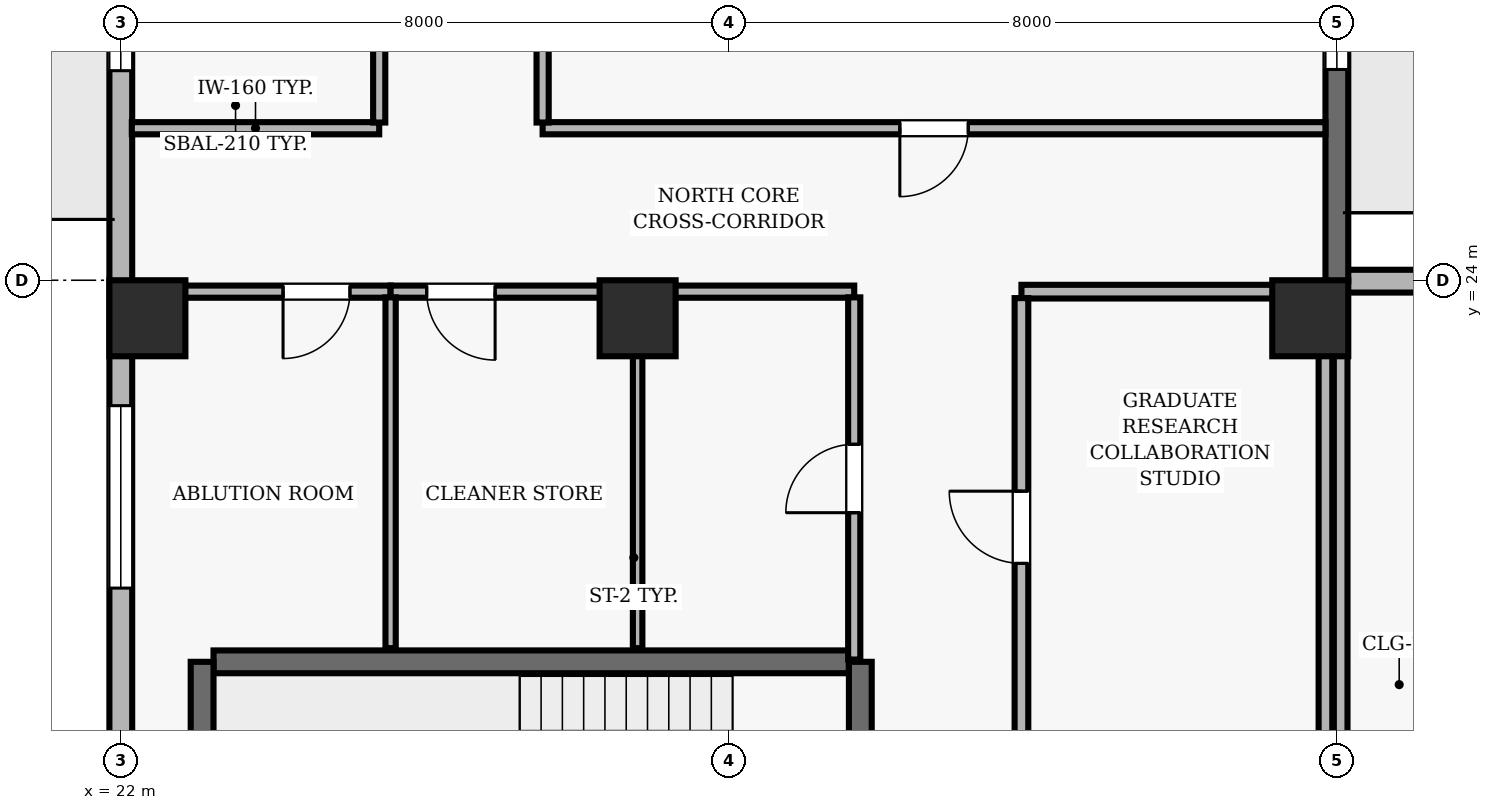
"""IFC4 building model, lengths in metres.
Left out: names, types, materials, properties, quantities, classifications, styles, units other than length and angle.
Written with IfcOpenShell. Run it as: python <this file> out.ifc"""

import sys

from ifc_helpers import new_model, si_unit, direction, frame, frame_2d, origin, origin_2d, place, context, subcontext, project, spatial, rectangle, extrude, element, fill, save


model = new_model("IFC4")
c1 = context("Model", 3, precision=1e-05, world=origin(), true_north=direction((0.0, 1.0)))
c2 = subcontext(c1, "Body", "Model", "MODEL_VIEW")
j1 = project(units=[si_unit("LENGTHUNIT", "METRE"), si_unit("PLANEANGLEUNIT", "RADIAN")], contexts=[c1])
p1 = place(None, origin())
s1 = spatial("IfcSite", under=j1, at=p1, CompositionType="ELEMENT")
p2 = place(p1, origin())
s2 = spatial("IfcBuilding", under=s1, at=p2, CompositionType="ELEMENT")
p3 = place(p2, frame((0.0, 0.0, 191.4)))
s3 = spatial("IfcBuildingStorey", under=s2, at=p3, CompositionType="ELEMENT", Elevation=191.4)
for number, where, z_axis, x_axis in (
    (1, (22.35, 23.5, 0.0), (0.0, 0.0, 1.0), (1.0, 0.0, 0.0)),
    (2, (28.8, 23.5, 0.0), (0.0, 0.0, 1.0), (1.0, 0.0, 0.0)),
    (3, (37.65, 23.5, 0.0), (0.0, 0.0, 1.0), (1.0, 0.0, 0.0)),
):
    element("IfcColumn", number, at=place(p3, frame(where, z_axis=z_axis, x_axis=x_axis)), inside=s3, PredefinedType="COLUMN", context=c2, shape_type="SweptSolid", body=[
        extrude(rectangle(XDim=1.0, YDim=1.0, at=origin_2d()), origin(), (0.0, 0.0, 1.0), 3.9),
    ])
p4 = place(p3, frame((47.35, 23.988, 0.0), z_axis=(0.0, 0.0, 1.0), x_axis=(-1.0, 0.0, 0.0)))
e4 = element("IfcWall", 4, at=p4, inside=s3, PredefinedType="SOLIDWALL", context=c2, shape_type="SweptSolid", body=[
    extrude(rectangle(XDim=9.35, YDim=0.3, at=frame_2d((4.675, 0.0))), origin(), (0.0, 0.0, 1.0), 3.69),
])
p5 = place(p4, frame((3.925, 0.0, 0.9)))
e5 = element("IfcOpeningElement", 5, at=p5, cuts=e4, PredefinedType="OPENING", context=c2, shape_type="SweptSolid", body=[
    extrude(rectangle(XDim=1.5, YDim=1.8, at=frame_2d((0.75, 0.9))), frame((0.0, 0.16, 0.0), z_axis=(0.0, -1.0, 0.0), x_axis=(1.0, 0.0, 0.0)), (0.0, 0.0, 1.0), 0.32),
])
p6 = place(p3, frame((38.0, 23.988, 0.0), z_axis=(0.0, 0.0, 1.0), x_axis=(0.0, 1.0, 0.0)))
e6 = element("IfcWall", 6, at=p6, inside=s3, PredefinedType="SOLIDWALL", context=c2, shape_type="SweptSolid", body=[
    extrude(rectangle(XDim=16.712, YDim=0.3, at=frame_2d((8.356, 0.0))), origin(), (0.0, 0.0, 1.0), 3.69),
])
p7 = place(p6, frame((7.956, 0.0, 0.0)))
e7 = element("IfcOpeningElement", 7, at=p7, cuts=e6, PredefinedType="OPENING", context=c2, shape_type="SweptSolid", body=[
    extrude(rectangle(XDim=1.0, YDim=2.2, at=frame_2d((0.5, 1.1))), frame((0.0, 0.16, 0.0), z_axis=(0.0, -1.0, 0.0), x_axis=(1.0, 0.0, 0.0)), (0.0, 0.0, 1.0), 0.32),
])
p8 = place(p6, frame((2.785, 0.0, 0.9)))
e8 = element("IfcOpeningElement", 8, at=p8, cuts=e6, PredefinedType="OPENING", context=c2, shape_type="SweptSolid", body=[
    extrude(rectangle(XDim=1.8, YDim=1.8, at=frame_2d((0.9, 0.9))), frame((0.0, 0.16, 0.0), z_axis=(0.0, -1.0, 0.0), x_axis=(1.0, 0.0, 0.0)), (0.0, 0.0, 1.0), 0.32),
])
p9 = place(p3, frame((22.0, 40.7, 0.0), z_axis=(0.0, 0.0, 1.0), x_axis=(0.0, -1.0, 0.0)))
e9 = element("IfcWall", 9, at=p9, inside=s3, PredefinedType="SOLIDWALL", context=c2, shape_type="SweptSolid", body=[
    extrude(rectangle(XDim=38.2, YDim=0.3, at=frame_2d((19.1, 0.0))), origin(), (0.0, 0.0, 1.0), 3.69),
])
p10 = place(p9, frame((7.8, 0.0, 0.0)))
e10 = element("IfcOpeningElement", 10, at=p10, cuts=e9, PredefinedType="OPENING", context=c2, shape_type="SweptSolid", body=[
    extrude(rectangle(XDim=1.0, YDim=2.2, at=frame_2d((0.5, 1.1))), frame((0.0, 0.16, 0.0), z_axis=(0.0, -1.0, 0.0), x_axis=(1.0, 0.0, 0.0)), (0.0, 0.0, 1.0), 0.32),
])
p11 = place(p9, frame((11.543, 0.0, 0.9)))
e11 = element("IfcOpeningElement", 11, at=p11, cuts=e9, PredefinedType="OPENING", context=c2, shape_type="SweptSolid", body=[
    extrude(rectangle(XDim=2.4, YDim=2.2, at=frame_2d((1.2, 1.1))), frame((0.0, 0.16, 0.0), z_axis=(0.0, -1.0, 0.0), x_axis=(1.0, 0.0, 0.0)), (0.0, 0.0, 1.0), 0.32),
])
p12 = place(p9, frame((18.35, 0.0, 0.9)))
e12 = element("IfcOpeningElement", 12, at=p12, cuts=e9, PredefinedType="OPENING", context=c2, shape_type="SweptSolid", body=[
    extrude(rectangle(XDim=2.4, YDim=2.2, at=frame_2d((1.2, 1.1))), frame((0.0, 0.16, 0.0), z_axis=(0.0, -1.0, 0.0), x_axis=(1.0, 0.0, 0.0)), (0.0, 0.0, 1.0), 0.32),
])
p13 = place(p9, frame((22.907, 0.0, 0.9)))
e13 = element("IfcOpeningElement", 13, at=p13, cuts=e9, PredefinedType="OPENING", context=c2, shape_type="SweptSolid", body=[
    extrude(rectangle(XDim=2.4, YDim=2.2, at=frame_2d((1.2, 1.1))), frame((0.0, 0.16, 0.0), z_axis=(0.0, -1.0, 0.0), x_axis=(1.0, 0.0, 0.0)), (0.0, 0.0, 1.0), 0.32),
])
p14 = place(p9, frame((28.814, 0.0, 0.9)))
e14 = element("IfcOpeningElement", 14, at=p14, cuts=e9, PredefinedType="OPENING", context=c2, shape_type="SweptSolid", body=[
    extrude(rectangle(XDim=2.4, YDim=2.2, at=frame_2d((1.2, 1.1))), frame((0.0, 0.16, 0.0), z_axis=(0.0, -1.0, 0.0), x_axis=(1.0, 0.0, 0.0)), (0.0, 0.0, 1.0), 0.32),
])
p15 = place(p3, frame((31.58, 18.98, 0.0), z_axis=(0.0, 0.0, 1.0), x_axis=(-1.0, 0.0, 0.0)))
e15 = element("IfcWall", 15, at=p15, inside=s3, PredefinedType="SHEAR", context=c2, shape_type="SweptSolid", body=[
    extrude(rectangle(XDim=8.36, YDim=0.3, at=frame_2d((4.18, 0.0))), origin(), (0.0, 0.0, 1.0), 3.69),
])
p16 = place(p3, frame((23.07, 18.98, 0.0), z_axis=(0.0, 0.0, 1.0), x_axis=(0.0, -1.0, 0.0)))
e16 = element("IfcWall", 16, at=p16, inside=s3, PredefinedType="SHEAR", context=c2, shape_type="SweptSolid", body=[
    extrude(rectangle(XDim=3.51, YDim=0.3, at=frame_2d((1.755, 0.0))), origin(), (0.0, 0.0, 1.0), 3.69),
])
p17 = place(p3, frame((31.73, 15.47, 0.0), z_axis=(0.0, 0.0, 1.0), x_axis=(0.0, 1.0, 0.0)))
e17 = element("IfcWall", 17, at=p17, inside=s3, PredefinedType="SHEAR", context=c2, shape_type="SweptSolid", body=[
    extrude(rectangle(XDim=3.51, YDim=0.3, at=frame_2d((1.755, 0.0))), origin(), (0.0, 0.0, 1.0), 3.69),
])
p18 = place(p17, frame((1.18, 0.0, 0.0)))
e18 = element("IfcOpeningElement", 18, at=p18, cuts=e17, PredefinedType="OPENING", context=c2, shape_type="SweptSolid", body=[
    extrude(rectangle(XDim=1.15, YDim=2.15, at=frame_2d((0.575, 1.075))), frame((0.0, 0.16, 0.0), z_axis=(0.0, -1.0, 0.0), x_axis=(1.0, 0.0, 0.0)), (0.0, 0.0, 1.0), 0.32),
])
p19 = place(p3, frame((25.4, 26.0, 0.0), z_axis=(0.0, 0.0, 1.0), x_axis=(-1.0, 0.0, 0.0)))
e19 = element("IfcWall", 19, at=p19, inside=s3, PredefinedType="PARTITIONING", context=c2, shape_type="SweptSolid", body=[
    extrude(rectangle(XDim=3.255, YDim=0.16, at=frame_2d((1.627, 0.0))), origin(), (0.0, 0.0, 1.0), 3.69),
])
p20 = place(p3, frame((25.55, 23.85, 0.0), z_axis=(0.0, 0.0, 1.0), x_axis=(-1.0, 0.0, 0.0)))
e20 = element("IfcWall", 20, at=p20, inside=s3, PredefinedType="PARTITIONING", context=c2, shape_type="SweptSolid", body=[
    extrude(rectangle(XDim=3.35, YDim=0.16, at=frame_2d((1.675, 0.0))), origin(), (0.0, 0.0, 1.0), 3.139),
])
p21 = place(p20, frame((0.535, 0.0, 0.0)))
e21 = element("IfcOpeningElement", 21, at=p21, cuts=e20, PredefinedType="OPENING", context=c2, shape_type="SweptSolid", body=[
    extrude(rectangle(XDim=0.88, YDim=2.1, at=frame_2d((0.44, 1.05))), frame((0.0, 0.09, 0.0), z_axis=(0.0, -1.0, 0.0), x_axis=(1.0, 0.0, 0.0)), (0.0, 0.0, 1.0), 0.18),
])
p22 = place(p3, frame((28.8, 23.85, 0.0), z_axis=(0.0, 0.0, 1.0), x_axis=(-1.0, 0.0, 0.0)))
e22 = element("IfcWall", 22, at=p22, inside=s3, PredefinedType="PARTITIONING", context=c2, shape_type="SweptSolid", body=[
    extrude(rectangle(XDim=3.25, YDim=0.16, at=frame_2d((1.625, 0.0))), origin(), (0.0, 0.0, 1.0), 3.139),
])
p23 = place(p22, frame((1.875, 0.0, 0.0)))
e23 = element("IfcOpeningElement", 23, at=p23, cuts=e22, PredefinedType="OPENING", context=c2, shape_type="SweptSolid", body=[
    extrude(rectangle(XDim=0.9, YDim=2.1, at=frame_2d((0.45, 1.05))), frame((0.0, 0.09, 0.0), z_axis=(0.0, -1.0, 0.0), x_axis=(1.0, 0.0, 0.0)), (0.0, 0.0, 1.0), 0.18),
])
p24 = place(p3, frame((31.65, 23.85, 0.0), z_axis=(0.0, 0.0, 1.0), x_axis=(-1.0, 0.0, 0.0)))
e24 = element("IfcWall", 24, at=p24, inside=s3, PredefinedType="PARTITIONING", context=c2, shape_type="SweptSolid", body=[
    extrude(rectangle(XDim=2.85, YDim=0.16, at=frame_2d((1.425, 0.0))), origin(), (0.0, 0.0, 1.0), 3.139),
])
p25 = place(p3, frame((37.85, 23.85, 0.0), z_axis=(0.0, 0.0, 1.0), x_axis=(-1.0, 0.0, 0.0)))
e25 = element("IfcWall", 25, at=p25, inside=s3, PredefinedType="PARTITIONING", context=c2, shape_type="SweptSolid", body=[
    extrude(rectangle(XDim=4.0, YDim=0.18, at=frame_2d((2.0, 0.0))), origin(), (0.0, 0.0, 1.0), 3.139),
])
p26 = place(p3, frame((37.85, 26.0, 0.0), z_axis=(0.0, 0.0, 1.0), x_axis=(-1.0, 0.0, 0.0)))
e26 = element("IfcWall", 26, at=p26, inside=s3, PredefinedType="PARTITIONING", context=c2, shape_type="SweptSolid", body=[
    extrude(rectangle(XDim=10.3, YDim=0.16, at=frame_2d((5.15, 0.0))), origin(), (0.0, 0.0, 1.0), 3.69),
])
p27 = place(p26, frame((4.7, 0.0, 0.0)))
e27 = element("IfcOpeningElement", 27, at=p27, cuts=e26, PredefinedType="OPENING", context=c2, shape_type="SweptSolid", body=[
    extrude(rectangle(XDim=0.9, YDim=2.1, at=frame_2d((0.45, 1.05))), frame((0.0, 0.09, 0.0), z_axis=(0.0, -1.0, 0.0), x_axis=(1.0, 0.0, 0.0)), (0.0, 0.0, 1.0), 0.18),
])
p28 = place(p3, frame((25.4, 29.942, 0.0), z_axis=(0.0, 0.0, 1.0), x_axis=(0.0, -1.0, 0.0)))
e28 = element("IfcWall", 28, at=p28, inside=s3, PredefinedType="PARTITIONING", context=c2, shape_type="SweptSolid", body=[
    extrude(rectangle(XDim=3.867, YDim=0.16, at=frame_2d((1.934, 0.0))), origin(), (0.0, 0.0, 1.0), 3.69),
])
p29 = place(p28, frame((1.484, 0.0, 0.0)))
e29 = element("IfcOpeningElement", 29, at=p29, cuts=e28, PredefinedType="OPENING", context=c2, shape_type="SweptSolid", body=[
    extrude(rectangle(XDim=0.9, YDim=2.1, at=frame_2d((0.45, 1.05))), frame((0.0, 0.09, 0.0), z_axis=(0.0, -1.0, 0.0), x_axis=(1.0, 0.0, 0.0)), (0.0, 0.0, 1.0), 0.18),
])
p30 = place(p3, frame((25.55, 19.16, 0.0), z_axis=(0.0, 0.0, 1.0), x_axis=(0.0, 1.0, 0.0)))
e30 = element("IfcWall", 30, at=p30, inside=s3, PredefinedType="PARTITIONING", context=c2, shape_type="SweptSolid", body=[
    extrude(rectangle(XDim=4.615, YDim=0.135, at=frame_2d((2.308, 0.0))), origin(), (0.0, 0.0, 1.0), 3.69),
])
p31 = place(p3, frame((27.55, 26.075, 0.0), z_axis=(0.0, 0.0, 1.0), x_axis=(0.0, 1.0, 0.0)))
e31 = element("IfcWall", 31, at=p31, inside=s3, PredefinedType="PARTITIONING", context=c2, shape_type="SweptSolid", body=[
    extrude(rectangle(XDim=3.867, YDim=0.16, at=frame_2d((1.934, 0.0))), origin(), (0.0, 0.0, 1.0), 3.69),
])
p32 = place(p3, frame((28.8, 23.775, 0.0), z_axis=(0.0, 0.0, 1.0), x_axis=(0.0, -1.0, 0.0)))
e32 = element("IfcWall", 32, at=p32, inside=s3, PredefinedType="PARTITIONING", context=c2, shape_type="SweptSolid", body=[
    extrude(rectangle(XDim=4.615, YDim=0.125, at=frame_2d((2.308, 0.0))), origin(), (0.0, 0.0, 1.0), 3.69),
])
p33 = place(p3, frame((31.65, 19.01, 0.0), z_axis=(0.0, 0.0, 1.0), x_axis=(0.0, 1.0, 0.0)))
e33 = element("IfcWall", 33, at=p33, inside=s3, PredefinedType="PARTITIONING", context=c2, shape_type="SweptSolid", body=[
    extrude(rectangle(XDim=4.765, YDim=0.16, at=frame_2d((2.382, 0.0))), origin(), (0.0, 0.0, 1.0), 3.69),
])
p34 = place(p33, frame((1.932, 0.0, 0.0)))
e34 = element("IfcOpeningElement", 34, at=p34, cuts=e33, PredefinedType="OPENING", context=c2, shape_type="SweptSolid", body=[
    extrude(rectangle(XDim=0.9, YDim=2.1, at=frame_2d((0.45, 1.05))), frame((0.0, 0.09, 0.0), z_axis=(0.0, -1.0, 0.0), x_axis=(1.0, 0.0, 0.0)), (0.0, 0.0, 1.0), 0.18),
])
p35 = place(p3, frame((33.85, 17.735, 0.0), z_axis=(0.0, 0.0, 1.0), x_axis=(0.0, 1.0, 0.0)))
e35 = element("IfcWall", 35, at=p35, inside=s3, PredefinedType="PARTITIONING", context=c2, shape_type="SweptSolid", body=[
    extrude(rectangle(XDim=6.03, YDim=0.18, at=frame_2d((3.015, 0.0))), origin(), (0.0, 0.0, 1.0), 3.69),
])
p36 = place(p35, frame((2.54, 0.0, 0.0)))
e36 = element("IfcOpeningElement", 36, at=p36, cuts=e35, PredefinedType="OPENING", context=c2, shape_type="SweptSolid", body=[
    extrude(rectangle(XDim=0.95, YDim=2.1, at=frame_2d((0.475, 1.05))), frame((0.0, 0.1, 0.0), z_axis=(0.0, -1.0, 0.0), x_axis=(1.0, 0.0, 0.0)), (0.0, 0.0, 1.0), 0.2),
])
p37 = place(p3, frame((37.85, 17.65, 0.0), z_axis=(0.0, 0.0, 1.0), x_axis=(0.0, 1.0, 0.0)))
e37 = element("IfcWall", 37, at=p37, inside=s3, PredefinedType="PARTITIONING", context=c2, shape_type="SweptSolid", body=[
    extrude(rectangle(XDim=6.115, YDim=0.18, at=frame_2d((3.058, 0.0))), origin(), (0.0, 0.0, 1.0), 3.139),
])
p38 = place(p3, frame((38.05, 23.843, 0.0), z_axis=(0.0, 0.0, 1.0), x_axis=(0.0, -1.0, 0.0)))
e38 = element("IfcWall", 38, at=p38, inside=s3, PredefinedType="PARTITIONING", context=c2, shape_type="SweptSolid", body=[
    extrude(rectangle(XDim=7.768, YDim=0.18, at=frame_2d((3.884, 0.0))), origin(), (0.0, 0.0, 1.0), 3.139),
])
p39 = place(p8, origin())
e39 = element("IfcWindow", 39, at=p39, inside=s3, PartitioningType="SINGLE_PANEL", PredefinedType="WINDOW", context=c2, shape_type="SweptSolid", body=[
    extrude(rectangle(XDim=1.8, YDim=1.8, at=frame_2d((0.9, 0.9))), frame((0.0, 0.03, 0.0), z_axis=(0.0, -1.0, 0.0), x_axis=(1.0, 0.0, 0.0)), (0.0, 0.0, 1.0), 0.06),
])
fill(e8, e39)
p40 = place(p11, origin())
e40 = element("IfcWindow", 40, at=p40, inside=s3, PartitioningType="SINGLE_PANEL", PredefinedType="WINDOW", context=c2, shape_type="SweptSolid", body=[
    extrude(rectangle(XDim=2.4, YDim=2.2, at=frame_2d((1.2, 1.1))), frame((0.0, 0.03, 0.0), z_axis=(0.0, -1.0, 0.0), x_axis=(1.0, 0.0, 0.0)), (0.0, 0.0, 1.0), 0.06),
])
fill(e11, e40)
p41 = place(p12, origin())
e41 = element("IfcWindow", 41, at=p41, inside=s3, PartitioningType="SINGLE_PANEL", PredefinedType="WINDOW", context=c2, shape_type="SweptSolid", body=[
    extrude(rectangle(XDim=2.4, YDim=2.2, at=frame_2d((1.2, 1.1))), frame((0.0, 0.03, 0.0), z_axis=(0.0, -1.0, 0.0), x_axis=(1.0, 0.0, 0.0)), (0.0, 0.0, 1.0), 0.06),
])
fill(e12, e41)
p42 = place(p36, origin())
e42 = element("IfcDoor", 42, at=p42, inside=s3, OperationType="SINGLE_SWING_RIGHT", PredefinedType="DOOR", context=c2, shape_type="SweptSolid", body=[
    extrude(rectangle(XDim=0.95, YDim=2.1, at=frame_2d((0.475, 1.05))), frame((0.0, 0.025, 0.0), z_axis=(0.0, -1.0, 0.0), x_axis=(1.0, 0.0, 0.0)), (0.0, 0.0, 1.0), 0.05),
])
fill(e36, e42)
p43 = place(p34, origin())
e43 = element("IfcDoor", 43, at=p43, inside=s3, OperationType="SINGLE_SWING_LEFT", PredefinedType="DOOR", context=c2, shape_type="SweptSolid", body=[
    extrude(rectangle(XDim=0.9, YDim=2.1, at=frame_2d((0.45, 1.05))), frame((0.0, 0.025, 0.0), z_axis=(0.0, -1.0, 0.0), x_axis=(1.0, 0.0, 0.0)), (0.0, 0.0, 1.0), 0.05),
])
fill(e34, e43)
p44 = place(p21, origin())
e44 = element("IfcDoor", 44, at=p44, inside=s3, OperationType="SINGLE_SWING_RIGHT", PredefinedType="DOOR", context=c2, shape_type="SweptSolid", body=[
    extrude(rectangle(XDim=0.88, YDim=2.1, at=frame_2d((0.44, 1.05))), frame((0.0, 0.025, 0.0), z_axis=(0.0, -1.0, 0.0), x_axis=(1.0, 0.0, 0.0)), (0.0, 0.0, 1.0), 0.05),
])
fill(e21, e44)
p45 = place(p23, origin())
e45 = element("IfcDoor", 45, at=p45, inside=s3, OperationType="SINGLE_SWING_LEFT", PredefinedType="DOOR", context=c2, shape_type="SweptSolid", body=[
    extrude(rectangle(XDim=0.9, YDim=2.1, at=frame_2d((0.45, 1.05))), frame((0.0, 0.025, 0.0), z_axis=(0.0, -1.0, 0.0), x_axis=(1.0, 0.0, 0.0)), (0.0, 0.0, 1.0), 0.05),
])
fill(e23, e45)
p46 = place(p27, origin())
e46 = element("IfcDoor", 46, at=p46, inside=s3, OperationType="SINGLE_SWING_RIGHT", PredefinedType="DOOR", context=c2, shape_type="SweptSolid", body=[
    extrude(rectangle(XDim=0.9, YDim=2.1, at=frame_2d((0.45, 1.05))), frame((0.0, 0.025, 0.0), z_axis=(0.0, -1.0, 0.0), x_axis=(1.0, 0.0, 0.0)), (0.0, 0.0, 1.0), 0.05),
])
fill(e27, e46)
save(model, sys.argv[1])
